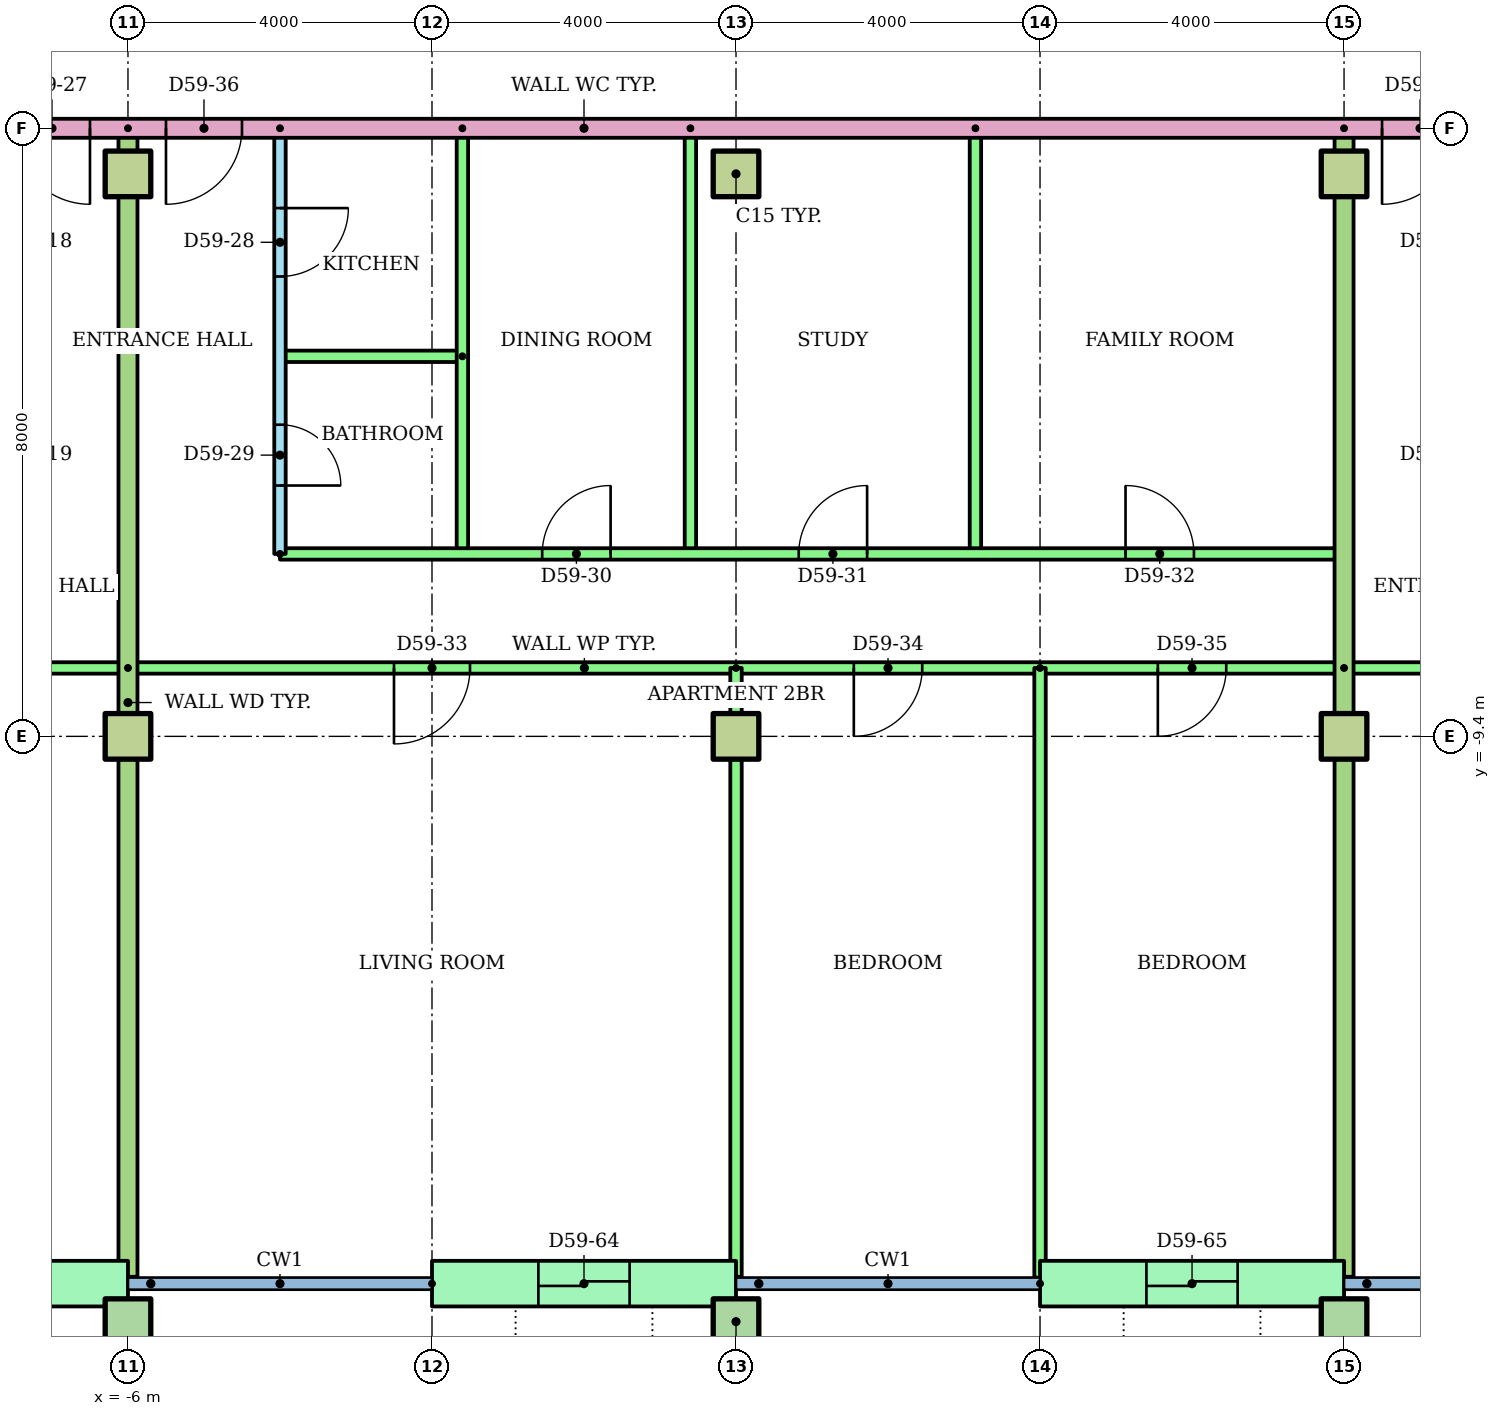
"""IFC4 building model, lengths in metres.
Left out: names, types, materials, properties, quantities, classifications, styles, units other than length and angle.
Written with IfcOpenShell. Run it as: python <this file> out.ifc"""

import sys

from ifc_helpers import new_model, si_unit, direction, frame, frame_2d, origin, origin_2d, place, context, subcontext, project, spatial, rectangle, hollow_rectangle, extrude, element, fill, save


model = new_model("IFC4")
c1 = context("Model", 3, precision=1e-05, world=origin(), true_north=direction((0.0, 1.0)))
c2 = subcontext(c1, "Body", "Model", "MODEL_VIEW")
j1 = project(units=[si_unit("LENGTHUNIT", "METRE"), si_unit("PLANEANGLEUNIT", "RADIAN")], contexts=[c1])
p1 = place(None, origin())
s1 = spatial("IfcSite", under=j1, at=p1, CompositionType="ELEMENT")
p2 = place(p1, origin())
s2 = spatial("IfcBuilding", under=s1, at=p2, CompositionType="ELEMENT")
p3 = place(p2, frame((0.0, 0.0, 226.8)))
s3 = spatial("IfcBuildingStorey", under=s2, at=p3, CompositionType="ELEMENT", Elevation=226.8)
for number, where in (
    (1, (-6.0, -17.1, 0.0)),
    (2, (2.0, -17.1, 0.0)),
    (3, (10.0, -17.1, 0.0)),
):
    element("IfcColumn", number, at=place(p3, frame(where)), inside=s3, PredefinedType="COLUMN", context=c2, shape_type="SweptSolid", body=[
        extrude(hollow_rectangle(XDim=0.6, YDim=0.6, WallThickness=0.03, at=origin_2d()), origin(), (0.0, 0.0, 1.0), 3.2),
    ])
for number, where in (
    (4, (-6.0, -9.4, 0.0)),
    (5, (2.0, -9.4, 0.0)),
    (6, (10.0, -9.4, 0.0)),
    (7, (-6.0, -2.0, 0.0)),
    (8, (2.0, -2.0, 0.0)),
    (9, (10.0, -2.0, 0.0)),
):
    element("IfcColumn", number, at=place(p3, frame(where)), inside=s3, PredefinedType="COLUMN", context=c2, shape_type="SweptSolid", body=[
        extrude(rectangle(XDim=0.6, YDim=0.6, at=origin_2d()), origin(), (0.0, 0.0, 1.0), 3.2),
    ])
p4 = place(p3, frame((-10.0, -16.6, 0.0)))
e10 = element("IfcWall", 10, at=p4, inside=s3, PredefinedType="STANDARD", context=c2, shape_type="SweptSolid", body=[
    extrude(rectangle(XDim=4.0, YDim=0.6, at=frame_2d((2.0, 0.0))), origin(), (0.0, 0.0, 1.0), 2.92),
])
p5 = place(p4, frame((1.4, 0.0, 0.0)))
e11 = element("IfcOpeningElement", 11, at=p5, cuts=e10, PredefinedType="OPENING", context=c2, shape_type="SweptSolid", body=[
    extrude(rectangle(XDim=1.2, YDim=2.1, at=frame_2d((0.6, 1.05))), frame((0.0, 0.31, 0.0), z_axis=(0.0, -1.0, 0.0), x_axis=(1.0, 0.0, 0.0)), (0.0, 0.0, 1.0), 0.62),
])
p6 = place(p3, frame((-2.0, -16.6, 0.0)))
e12 = element("IfcWall", 12, at=p6, inside=s3, PredefinedType="STANDARD", context=c2, shape_type="SweptSolid", body=[
    extrude(rectangle(XDim=4.0, YDim=0.6, at=frame_2d((2.0, 0.0))), origin(), (0.0, 0.0, 1.0), 2.92),
])
p7 = place(p6, frame((1.4, 0.0, 0.0)))
e13 = element("IfcOpeningElement", 13, at=p7, cuts=e12, PredefinedType="OPENING", context=c2, shape_type="SweptSolid", body=[
    extrude(rectangle(XDim=1.2, YDim=2.1, at=frame_2d((0.6, 1.05))), frame((0.0, 0.31, 0.0), z_axis=(0.0, -1.0, 0.0), x_axis=(1.0, 0.0, 0.0)), (0.0, 0.0, 1.0), 0.62),
])
p8 = place(p3, frame((6.0, -16.6, 0.0)))
e14 = element("IfcWall", 14, at=p8, inside=s3, PredefinedType="STANDARD", context=c2, shape_type="SweptSolid", body=[
    extrude(rectangle(XDim=4.0, YDim=0.6, at=frame_2d((2.0, 0.0))), origin(), (0.0, 0.0, 1.0), 2.92),
])
p9 = place(p8, frame((1.4, 0.0, 0.0)))
e15 = element("IfcOpeningElement", 15, at=p9, cuts=e14, PredefinedType="OPENING", context=c2, shape_type="SweptSolid", body=[
    extrude(rectangle(XDim=1.2, YDim=2.1, at=frame_2d((0.6, 1.05))), frame((0.0, 0.31, 0.0), z_axis=(0.0, -1.0, 0.0), x_axis=(1.0, 0.0, 0.0)), (0.0, 0.0, 1.0), 0.62),
])
p10 = place(p3, frame((-6.0, -8.5, 0.0), z_axis=(0.0, 0.0, 1.0), x_axis=(-1.0, 0.0, 0.0)))
e16 = element("IfcWall", 16, at=p10, inside=s3, PredefinedType="PARTITIONING", context=c2, shape_type="SweptSolid", body=[
    extrude(rectangle(XDim=22.91, YDim=0.15, at=frame_2d((11.455, 0.0))), origin(), (0.0, 0.0, 1.0), 2.4),
])
p11 = place(p10, frame((20.0, 0.0, 0.0)))
e17 = element("IfcOpeningElement", 17, at=p11, cuts=e16, PredefinedType="OPENING", context=c2, shape_type="SweptSolid", body=[
    extrude(rectangle(XDim=0.9, YDim=2.1, at=frame_2d((0.45, 1.05))), frame((0.0, 0.085, 0.0), z_axis=(0.0, -1.0, 0.0), x_axis=(1.0, 0.0, 0.0)), (0.0, 0.0, 1.0), 0.17),
])
p12 = place(p10, frame((12.6, 0.0, 0.0)))
e18 = element("IfcOpeningElement", 18, at=p12, cuts=e16, PredefinedType="OPENING", context=c2, shape_type="SweptSolid", body=[
    extrude(rectangle(XDim=1.0, YDim=2.1, at=frame_2d((0.5, 1.05))), frame((0.0, 0.085, 0.0), z_axis=(0.0, -1.0, 0.0), x_axis=(1.0, 0.0, 0.0)), (0.0, 0.0, 1.0), 0.17),
])
p13 = place(p10, frame((5.55, 0.0, 0.0)))
e19 = element("IfcOpeningElement", 19, at=p13, cuts=e16, PredefinedType="OPENING", context=c2, shape_type="SweptSolid", body=[
    extrude(rectangle(XDim=0.9, YDim=2.1, at=frame_2d((0.45, 1.05))), frame((0.0, 0.085, 0.0), z_axis=(0.0, -1.0, 0.0), x_axis=(1.0, 0.0, 0.0)), (0.0, 0.0, 1.0), 0.17),
])
p14 = place(p10, frame((1.55, 0.0, 0.0)))
e20 = element("IfcOpeningElement", 20, at=p14, cuts=e16, PredefinedType="OPENING", context=c2, shape_type="SweptSolid", body=[
    extrude(rectangle(XDim=0.9, YDim=2.1, at=frame_2d((0.45, 1.05))), frame((0.0, 0.085, 0.0), z_axis=(0.0, -1.0, 0.0), x_axis=(1.0, 0.0, 0.0)), (0.0, 0.0, 1.0), 0.17),
])
p15 = place(p3, frame((-4.0, -1.4, 0.0), z_axis=(0.0, 0.0, 1.0), x_axis=(0.0, -1.0, 0.0)))
e21 = element("IfcWall", 21, at=p15, inside=s3, PredefinedType="PARTITIONING", context=c2, shape_type="SweptSolid", body=[
    extrude(rectangle(XDim=5.6, YDim=0.15, at=frame_2d((2.8, 0.0))), origin(), (0.0, 0.0, 1.0), 2.4),
])
p16 = place(p15, frame((1.05, 0.0, 0.0)))
e22 = element("IfcOpeningElement", 22, at=p16, cuts=e21, PredefinedType="OPENING", context=c2, shape_type="SweptSolid", body=[
    extrude(rectangle(XDim=0.9, YDim=2.1, at=frame_2d((0.45, 1.05))), frame((0.0, 0.085, 0.0), z_axis=(0.0, -1.0, 0.0), x_axis=(1.0, 0.0, 0.0)), (0.0, 0.0, 1.0), 0.17),
])
p17 = place(p15, frame((3.9, 0.0, 0.0)))
e23 = element("IfcOpeningElement", 23, at=p17, cuts=e21, PredefinedType="OPENING", context=c2, shape_type="SweptSolid", body=[
    extrude(rectangle(XDim=0.8, YDim=2.1, at=frame_2d((0.4, 1.05))), frame((0.0, 0.085, 0.0), z_axis=(0.0, -1.0, 0.0), x_axis=(1.0, 0.0, 0.0)), (0.0, 0.0, 1.0), 0.17),
])
p18 = place(p3, frame((-1.6, -4.4, 0.0), z_axis=(0.0, 0.0, 1.0), x_axis=(-1.0, 0.0, 0.0)))
e24 = element("IfcWall", 24, at=p18, inside=s3, PredefinedType="PARTITIONING", context=c2, shape_type="SweptSolid", body=[
    extrude(rectangle(XDim=2.4, YDim=0.15, at=frame_2d((1.2, 0.0))), origin(), (0.0, 0.0, 1.0), 2.4),
])
for number, where, z_axis, x_axis in (
    (25, (-1.6, -1.4, 0.0), (0.0, 0.0, 1.0), (0.0, -1.0, 0.0)),
    (26, (1.4, -1.4, 0.0), (0.0, 0.0, 1.0), (0.0, -1.0, 0.0)),
    (27, (5.15, -1.4, 0.0), (0.0, 0.0, 1.0), (0.0, -1.0, 0.0)),
):
    element("IfcWall", number, at=place(p3, frame(where, z_axis=z_axis, x_axis=x_axis)), inside=s3, PredefinedType="PARTITIONING", context=c2, shape_type="SweptSolid", body=[
        extrude(rectangle(XDim=5.6, YDim=0.15, at=frame_2d((2.8, 0.0))), origin(), (0.0, 0.0, 1.0), 2.4),
    ])
p19 = place(p3, frame((-4.0, -7.0, 0.0)))
e28 = element("IfcWall", 28, at=p19, inside=s3, PredefinedType="PARTITIONING", context=c2, shape_type="SweptSolid", body=[
    extrude(rectangle(XDim=14.0, YDim=0.15, at=frame_2d((7.0, 0.0))), origin(), (0.0, 0.0, 1.0), 2.4),
])
p20 = place(p19, frame((3.45, 0.0, 0.0)))
e29 = element("IfcOpeningElement", 29, at=p20, cuts=e28, PredefinedType="OPENING", context=c2, shape_type="SweptSolid", body=[
    extrude(rectangle(XDim=0.9, YDim=2.1, at=frame_2d((0.45, 1.05))), frame((0.0, 0.085, 0.0), z_axis=(0.0, -1.0, 0.0), x_axis=(1.0, 0.0, 0.0)), (0.0, 0.0, 1.0), 0.17),
])
p21 = place(p19, frame((6.825, 0.0, 0.0)))
e30 = element("IfcOpeningElement", 30, at=p21, cuts=e28, PredefinedType="OPENING", context=c2, shape_type="SweptSolid", body=[
    extrude(rectangle(XDim=0.9, YDim=2.1, at=frame_2d((0.45, 1.05))), frame((0.0, 0.085, 0.0), z_axis=(0.0, -1.0, 0.0), x_axis=(1.0, 0.0, 0.0)), (0.0, 0.0, 1.0), 0.17),
])
p22 = place(p19, frame((11.125, 0.0, 0.0)))
e31 = element("IfcOpeningElement", 31, at=p22, cuts=e28, PredefinedType="OPENING", context=c2, shape_type="SweptSolid", body=[
    extrude(rectangle(XDim=0.9, YDim=2.1, at=frame_2d((0.45, 1.05))), frame((0.0, 0.085, 0.0), z_axis=(0.0, -1.0, 0.0), x_axis=(1.0, 0.0, 0.0)), (0.0, 0.0, 1.0), 0.17),
])
p23 = place(p3, frame((10.0, -8.5, 0.0), z_axis=(0.0, 0.0, 1.0), x_axis=(-1.0, 0.0, 0.0)))
e32 = element("IfcWall", 32, at=p23, inside=s3, PredefinedType="PARTITIONING", context=c2, shape_type="SweptSolid", body=[
    extrude(rectangle(XDim=16.0, YDim=0.15, at=frame_2d((8.0, 0.0))), origin(), (0.0, 0.0, 1.0), 2.4),
])
p24 = place(p23, frame((11.5, 0.0, 0.0)))
e33 = element("IfcOpeningElement", 33, at=p24, cuts=e32, PredefinedType="OPENING", context=c2, shape_type="SweptSolid", body=[
    extrude(rectangle(XDim=1.0, YDim=2.1, at=frame_2d((0.5, 1.05))), frame((0.0, 0.085, 0.0), z_axis=(0.0, -1.0, 0.0), x_axis=(1.0, 0.0, 0.0)), (0.0, 0.0, 1.0), 0.17),
])
p25 = place(p23, frame((5.55, 0.0, 0.0)))
e34 = element("IfcOpeningElement", 34, at=p25, cuts=e32, PredefinedType="OPENING", context=c2, shape_type="SweptSolid", body=[
    extrude(rectangle(XDim=0.9, YDim=2.1, at=frame_2d((0.45, 1.05))), frame((0.0, 0.085, 0.0), z_axis=(0.0, -1.0, 0.0), x_axis=(1.0, 0.0, 0.0)), (0.0, 0.0, 1.0), 0.17),
])
p26 = place(p23, frame((1.55, 0.0, 0.0)))
e35 = element("IfcOpeningElement", 35, at=p26, cuts=e32, PredefinedType="OPENING", context=c2, shape_type="SweptSolid", body=[
    extrude(rectangle(XDim=0.9, YDim=2.1, at=frame_2d((0.45, 1.05))), frame((0.0, 0.085, 0.0), z_axis=(0.0, -1.0, 0.0), x_axis=(1.0, 0.0, 0.0)), (0.0, 0.0, 1.0), 0.17),
])
p27 = place(p3, frame((2.0, -8.5, 0.0), z_axis=(0.0, 0.0, 1.0), x_axis=(0.0, -1.0, 0.0)))
e36 = element("IfcWall", 36, at=p27, inside=s3, PredefinedType="PARTITIONING", context=c2, shape_type="SweptSolid", body=[
    extrude(rectangle(XDim=8.01, YDim=0.15, at=frame_2d((4.005, 0.0))), origin(), (0.0, 0.0, 1.0), 2.4),
])
p28 = place(p3, frame((6.0, -8.5, 0.0), z_axis=(0.0, 0.0, 1.0), x_axis=(0.0, -1.0, 0.0)))
e37 = element("IfcWall", 37, at=p28, inside=s3, PredefinedType="PARTITIONING", context=c2, shape_type="SweptSolid", body=[
    extrude(rectangle(XDim=8.021, YDim=0.15, at=frame_2d((4.01, 0.0))), origin(), (0.0, 0.0, 1.0), 2.4),
])
p29 = place(p3, frame((-6.0, -1.4, 0.0), z_axis=(0.0, 0.0, 1.0), x_axis=(0.0, -1.0, 0.0)))
e38 = element("IfcWall", 38, at=p29, inside=s3, PredefinedType="PARTITIONING", context=c2, shape_type="SweptSolid", body=[
    extrude(rectangle(XDim=15.11, YDim=0.25, at=frame_2d((7.555, 0.0))), origin(), (0.0, 0.0, 1.0), 2.4),
])
p30 = place(p3, frame((28.92, -8.5, 0.0), z_axis=(0.0, 0.0, 1.0), x_axis=(-1.0, 0.0, 0.0)))
e39 = element("IfcWall", 39, at=p30, inside=s3, PredefinedType="PARTITIONING", context=c2, shape_type="SweptSolid", body=[
    extrude(rectangle(XDim=18.92, YDim=0.15, at=frame_2d((9.46, 0.0))), origin(), (0.0, 0.0, 1.0), 2.4),
])
p31 = place(p30, frame((16.47, 0.0, 0.0)))
e40 = element("IfcOpeningElement", 40, at=p31, cuts=e39, PredefinedType="OPENING", context=c2, shape_type="SweptSolid", body=[
    extrude(rectangle(XDim=0.9, YDim=2.1, at=frame_2d((0.45, 1.05))), frame((0.0, 0.085, 0.0), z_axis=(0.0, -1.0, 0.0), x_axis=(1.0, 0.0, 0.0)), (0.0, 0.0, 1.0), 0.17),
])
p32 = place(p30, frame((9.32, 0.0, 0.0)))
e41 = element("IfcOpeningElement", 41, at=p32, cuts=e39, PredefinedType="OPENING", context=c2, shape_type="SweptSolid", body=[
    extrude(rectangle(XDim=1.0, YDim=2.1, at=frame_2d((0.5, 1.05))), frame((0.0, 0.085, 0.0), z_axis=(0.0, -1.0, 0.0), x_axis=(1.0, 0.0, 0.0)), (0.0, 0.0, 1.0), 0.17),
])
p33 = place(p30, frame((1.544, 0.0, 0.0)))
e42 = element("IfcOpeningElement", 42, at=p33, cuts=e39, PredefinedType="OPENING", context=c2, shape_type="SweptSolid", body=[
    extrude(rectangle(XDim=0.9, YDim=2.1, at=frame_2d((0.45, 1.05))), frame((0.0, 0.085, 0.0), z_axis=(0.0, -1.0, 0.0), x_axis=(1.0, 0.0, 0.0)), (0.0, 0.0, 1.0), 0.17),
])
p34 = place(p3, frame((10.0, -1.4, 0.0), z_axis=(0.0, 0.0, 1.0), x_axis=(0.0, -1.0, 0.0)))
e43 = element("IfcWall", 43, at=p34, inside=s3, PredefinedType="PARTITIONING", context=c2, shape_type="SweptSolid", body=[
    extrude(rectangle(XDim=15.11, YDim=0.25, at=frame_2d((7.555, 0.0))), origin(), (0.0, 0.0, 1.0), 2.4),
])
p35 = place(p3, frame((14.0, -1.4, 0.0), z_axis=(0.0, 0.0, 1.0), x_axis=(-1.0, 0.0, 0.0)))
e44 = element("IfcWall", 44, at=p35, inside=s3, PredefinedType="PARTITIONING", context=c2, shape_type="SweptSolid", body=[
    extrude(rectangle(XDim=28.0, YDim=0.25, at=frame_2d((14.0, 0.0))), origin(), (0.0, 0.0, 1.0), 2.4),
])
p36 = place(p35, frame((20.5, 0.0, 0.0)))
e45 = element("IfcOpeningElement", 45, at=p36, cuts=e44, PredefinedType="OPENING", context=c2, shape_type="SweptSolid", body=[
    extrude(rectangle(XDim=1.0, YDim=2.1, at=frame_2d((0.5, 1.05))), frame((0.0, 0.135, 0.0), z_axis=(0.0, -1.0, 0.0), x_axis=(1.0, 0.0, 0.0)), (0.0, 0.0, 1.0), 0.27),
])
p37 = place(p35, frame((18.5, 0.0, 0.0)))
e46 = element("IfcOpeningElement", 46, at=p37, cuts=e44, PredefinedType="OPENING", context=c2, shape_type="SweptSolid", body=[
    extrude(rectangle(XDim=1.0, YDim=2.1, at=frame_2d((0.5, 1.05))), frame((0.0, 0.135, 0.0), z_axis=(0.0, -1.0, 0.0), x_axis=(1.0, 0.0, 0.0)), (0.0, 0.0, 1.0), 0.27),
])
p38 = place(p35, frame((2.5, 0.0, 0.0)))
e47 = element("IfcOpeningElement", 47, at=p38, cuts=e44, PredefinedType="OPENING", context=c2, shape_type="SweptSolid", body=[
    extrude(rectangle(XDim=1.0, YDim=2.1, at=frame_2d((0.5, 1.05))), frame((0.0, 0.135, 0.0), z_axis=(0.0, -1.0, 0.0), x_axis=(1.0, 0.0, 0.0)), (0.0, 0.0, 1.0), 0.27),
])
p39 = place(p36, origin())
e48 = element("IfcDoor", 48, at=p39, inside=s3, OperationType="SINGLE_SWING_LEFT", PredefinedType="DOOR", context=c2, shape_type="SweptSolid", body=[
    extrude(rectangle(XDim=1.0, YDim=2.1, at=frame_2d((0.5, 1.05))), frame((0.0, 0.025, 0.0), z_axis=(0.0, -1.0, 0.0), x_axis=(1.0, 0.0, 0.0)), (0.0, 0.0, 1.0), 0.05),
])
fill(e45, e48)
p40 = place(p16, origin())
e49 = element("IfcDoor", 49, at=p40, inside=s3, OperationType="SINGLE_SWING_LEFT", PredefinedType="DOOR", context=c2, shape_type="SweptSolid", body=[
    extrude(rectangle(XDim=0.9, YDim=2.1, at=frame_2d((0.45, 1.05))), frame((0.0, 0.025, 0.0), z_axis=(0.0, -1.0, 0.0), x_axis=(1.0, 0.0, 0.0)), (0.0, 0.0, 1.0), 0.05),
])
fill(e22, e49)
p41 = place(p17, origin())
e50 = element("IfcDoor", 50, at=p41, inside=s3, OperationType="SINGLE_SWING_RIGHT", PredefinedType="DOOR", context=c2, shape_type="SweptSolid", body=[
    extrude(rectangle(XDim=0.8, YDim=2.1, at=frame_2d((0.4, 1.05))), frame((0.0, 0.025, 0.0), z_axis=(0.0, -1.0, 0.0), x_axis=(1.0, 0.0, 0.0)), (0.0, 0.0, 1.0), 0.05),
])
fill(e23, e50)
p42 = place(p20, origin())
e51 = element("IfcDoor", 51, at=p42, inside=s3, OperationType="SINGLE_SWING_RIGHT", PredefinedType="DOOR", context=c2, shape_type="SweptSolid", body=[
    extrude(rectangle(XDim=0.9, YDim=2.1, at=frame_2d((0.45, 1.05))), frame((0.0, 0.025, 0.0), z_axis=(0.0, -1.0, 0.0), x_axis=(1.0, 0.0, 0.0)), (0.0, 0.0, 1.0), 0.05),
])
fill(e29, e51)
p43 = place(p21, origin())
e52 = element("IfcDoor", 52, at=p43, inside=s3, OperationType="SINGLE_SWING_RIGHT", PredefinedType="DOOR", context=c2, shape_type="SweptSolid", body=[
    extrude(rectangle(XDim=0.9, YDim=2.1, at=frame_2d((0.45, 1.05))), frame((0.0, 0.025, 0.0), z_axis=(0.0, -1.0, 0.0), x_axis=(1.0, 0.0, 0.0)), (0.0, 0.0, 1.0), 0.05),
])
fill(e30, e52)
p44 = place(p22, origin())
e53 = element("IfcDoor", 53, at=p44, inside=s3, OperationType="SINGLE_SWING_LEFT", PredefinedType="DOOR", context=c2, shape_type="SweptSolid", body=[
    extrude(rectangle(XDim=0.9, YDim=2.1, at=frame_2d((0.45, 1.05))), frame((0.0, 0.025, 0.0), z_axis=(0.0, -1.0, 0.0), x_axis=(1.0, 0.0, 0.0)), (0.0, 0.0, 1.0), 0.05),
])
fill(e31, e53)
p45 = place(p24, origin())
e54 = element("IfcDoor", 54, at=p45, inside=s3, OperationType="SINGLE_SWING_RIGHT", PredefinedType="DOOR", context=c2, shape_type="SweptSolid", body=[
    extrude(rectangle(XDim=1.0, YDim=2.1, at=frame_2d((0.5, 1.05))), frame((0.0, 0.025, 0.0), z_axis=(0.0, -1.0, 0.0), x_axis=(1.0, 0.0, 0.0)), (0.0, 0.0, 1.0), 0.05),
])
fill(e33, e54)
p46 = place(p25, origin())
e55 = element("IfcDoor", 55, at=p46, inside=s3, OperationType="SINGLE_SWING_RIGHT", PredefinedType="DOOR", context=c2, shape_type="SweptSolid", body=[
    extrude(rectangle(XDim=0.9, YDim=2.1, at=frame_2d((0.45, 1.05))), frame((0.0, 0.025, 0.0), z_axis=(0.0, -1.0, 0.0), x_axis=(1.0, 0.0, 0.0)), (0.0, 0.0, 1.0), 0.05),
])
fill(e34, e55)
p47 = place(p26, origin())
e56 = element("IfcDoor", 56, at=p47, inside=s3, OperationType="SINGLE_SWING_RIGHT", PredefinedType="DOOR", context=c2, shape_type="SweptSolid", body=[
    extrude(rectangle(XDim=0.9, YDim=2.1, at=frame_2d((0.45, 1.05))), frame((0.0, 0.025, 0.0), z_axis=(0.0, -1.0, 0.0), x_axis=(1.0, 0.0, 0.0)), (0.0, 0.0, 1.0), 0.05),
])
fill(e35, e56)
p48 = place(p37, origin())
e57 = element("IfcDoor", 57, at=p48, inside=s3, OperationType="SINGLE_SWING_RIGHT", PredefinedType="DOOR", context=c2, shape_type="SweptSolid", body=[
    extrude(rectangle(XDim=1.0, YDim=2.1, at=frame_2d((0.5, 1.05))), frame((0.0, 0.025, 0.0), z_axis=(0.0, -1.0, 0.0), x_axis=(1.0, 0.0, 0.0)), (0.0, 0.0, 1.0), 0.05),
])
fill(e46, e57)
p49 = place(p38, origin())
e58 = element("IfcDoor", 58, at=p49, inside=s3, OperationType="SINGLE_SWING_RIGHT", PredefinedType="DOOR", context=c2, shape_type="SweptSolid", body=[
    extrude(rectangle(XDim=1.0, YDim=2.1, at=frame_2d((0.5, 1.05))), frame((0.0, 0.025, 0.0), z_axis=(0.0, -1.0, 0.0), x_axis=(1.0, 0.0, 0.0)), (0.0, 0.0, 1.0), 0.05),
])
fill(e47, e58)
p50 = place(p7, origin())
e59 = element("IfcDoor", 59, at=p50, inside=s3, OperationType="SLIDING_TO_LEFT", PredefinedType="DOOR", context=c2, shape_type="SweptSolid", body=[
    extrude(rectangle(XDim=1.2, YDim=2.1, at=frame_2d((0.6, 1.05))), frame((0.0, 0.025, 0.0), z_axis=(0.0, -1.0, 0.0), x_axis=(1.0, 0.0, 0.0)), (0.0, 0.0, 1.0), 0.05),
])
fill(e13, e59)
p51 = place(p9, origin())
e60 = element("IfcDoor", 60, at=p51, inside=s3, OperationType="SLIDING_TO_LEFT", PredefinedType="DOOR", context=c2, shape_type="SweptSolid", body=[
    extrude(rectangle(XDim=1.2, YDim=2.1, at=frame_2d((0.6, 1.05))), frame((0.0, 0.025, 0.0), z_axis=(0.0, -1.0, 0.0), x_axis=(1.0, 0.0, 0.0)), (0.0, 0.0, 1.0), 0.05),
])
fill(e15, e60)
save(model, sys.argv[1])
